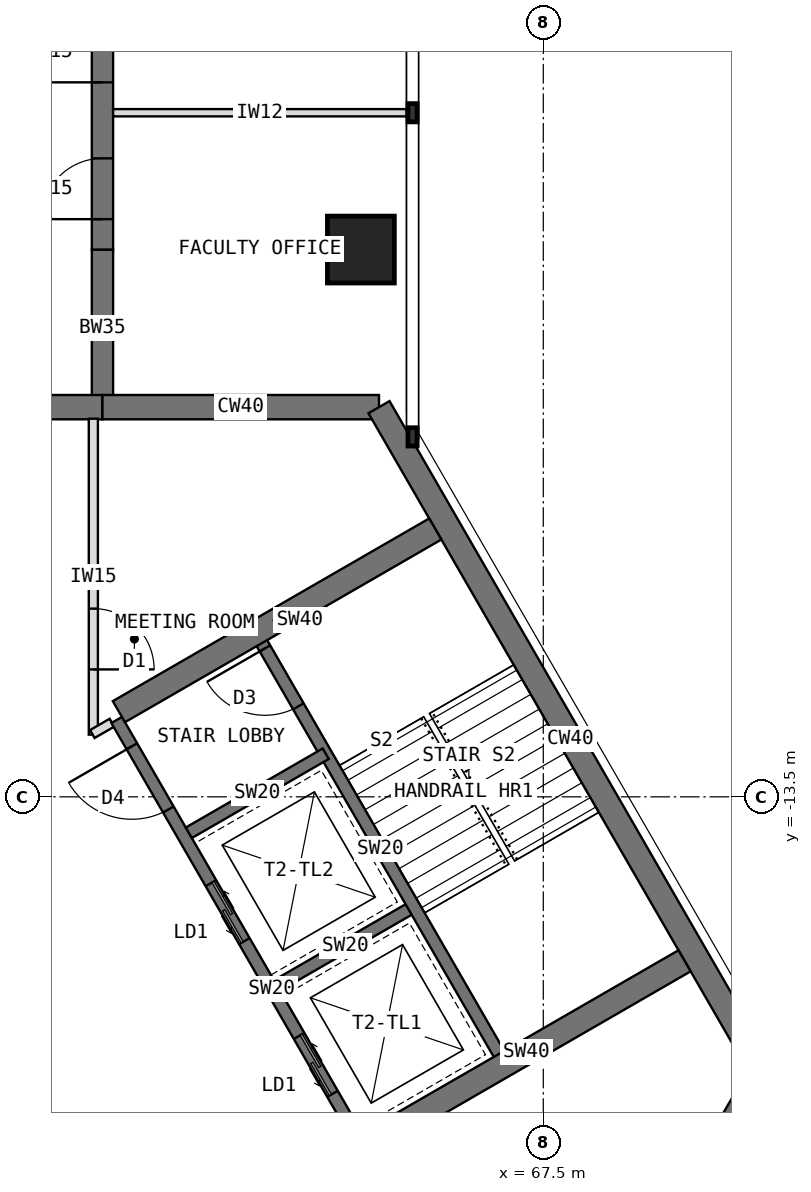
"""IFC4 building model, lengths in metres.
Left out: names, types, materials, properties, quantities, classifications, styles, units other than length and angle.
Written with IfcOpenShell. Run it as: python <this file> out.ifc"""

import sys

from ifc_helpers import new_model, si_unit, direction, frame, frame_2d, origin, origin_2d, place, context, subcontext, project, spatial, rectangle, extrude, element, fill, save


model = new_model("IFC4")
c1 = context("Model", 3, precision=1e-05, world=origin(), true_north=direction((0.0, 1.0)))
c2 = subcontext(c1, "Body", "Model", "MODEL_VIEW")
j1 = project(units=[si_unit("LENGTHUNIT", "METRE"), si_unit("PLANEANGLEUNIT", "RADIAN")], contexts=[c1])
p1 = place(None, origin())
s1 = spatial("IfcSite", under=j1, at=p1, CompositionType="ELEMENT")
p2 = place(p1, origin())
s2 = spatial("IfcBuilding", under=s1, at=p2, CompositionType="ELEMENT")
p3 = place(p2, frame((0.0, 0.0, 243.5)))
s3 = spatial("IfcBuildingStorey", under=s2, at=p3, CompositionType="ELEMENT", Elevation=243.5)
p4 = place(p3, frame((64.798, -7.092, 0.0), z_axis=(0.0, 0.0, 1.0), x_axis=(-1.0, 0.0, 0.0)))
e1 = element("IfcWall", 1, at=p4, inside=s3, PredefinedType="SHEAR", context=c2, shape_type="SweptSolid", body=[
    extrude(rectangle(XDim=4.548, YDim=0.4, at=frame_2d((2.274, 0.0))), origin(), (0.0, 0.0, 1.0), 4.0),
])
p5 = place(p3, frame((60.25, -7.092, 0.0), z_axis=(0.0, 0.0, 1.0), x_axis=(-1.0, 0.0, 0.0)))
e2 = element("IfcWall", 2, at=p5, inside=s3, PredefinedType="SHEAR", context=c2, shape_type="SweptSolid", body=[
    extrude(rectangle(XDim=3.5, YDim=0.4, at=frame_2d((1.75, 0.0))), origin(), (0.0, 0.0, 1.0), 4.0),
])
p6 = place(p5, frame((0.85, 0.0, 0.0)))
e3 = element("IfcOpeningElement", 3, at=p6, cuts=e2, PredefinedType="OPENING", context=c2, shape_type="SweptSolid", body=[
    extrude(rectangle(XDim=1.8, YDim=2.1, at=frame_2d((0.9, 1.05))), frame((0.0, 0.21, 0.0), z_axis=(0.0, -1.0, 0.0), x_axis=(1.0, 0.0, 0.0)), (0.0, 0.0, 1.0), 0.42),
])
p7 = place(p3, frame((68.822, -21.939, 0.0), z_axis=(0.0, 0.0, 1.0), x_axis=(0.500024481964, 0.866011268655, 0.0)))
e4 = element("IfcWall", 4, at=p7, inside=s3, PredefinedType="SHEAR", context=c2, shape_type="SweptSolid", body=[
    extrude(rectangle(XDim=4.548, YDim=0.4, at=frame_2d((2.274, 0.0))), origin(), (0.0, 0.0, 1.0), 4.0),
])
p8 = place(p3, frame((71.096, -18.0, 0.0), z_axis=(0.0, 0.0, 1.0), x_axis=(-0.500005998175, 0.866021940709, 0.0)))
e5 = element("IfcWall", 5, at=p8, inside=s3, PredefinedType="SHEAR", context=c2, shape_type="SweptSolid", body=[
    extrude(rectangle(XDim=12.596, YDim=0.4, at=frame_2d((6.298, 0.0))), origin(), (0.0, 0.0, 1.0), 4.0),
])
p9 = place(p3, frame((60.25, -7.092, 0.0), z_axis=(0.0, 0.0, 1.0), x_axis=(0.0, 1.0, 0.0)))
e6 = element("IfcWall", 6, at=p9, inside=s3, PredefinedType="SHEAR", context=c2, shape_type="SweptSolid", body=[
    extrude(rectangle(XDim=2.592, YDim=0.35, at=frame_2d((1.296, 0.0))), origin(), (0.0, 0.0, 1.0), 4.0),
])
p10 = place(p3, frame((60.25, -4.5, 0.0), z_axis=(0.0, 0.0, 1.0), x_axis=(0.0, 1.0, 0.0)))
e7 = element("IfcWall", 7, at=p10, inside=s3, PredefinedType="SHEAR", context=c2, shape_type="SweptSolid", body=[
    extrude(rectangle(XDim=13.2, YDim=0.35, at=frame_2d((6.6, 0.0))), origin(), (0.0, 0.0, 1.0), 4.0),
])
p11 = place(p10, frame((0.5, 0.0, 0.0)))
e8 = element("IfcOpeningElement", 8, at=p11, cuts=e7, PredefinedType="OPENING", context=c2, shape_type="SweptSolid", body=[
    extrude(rectangle(XDim=1.0, YDim=2.1, at=frame_2d((0.5, 1.05))), frame((0.0, 0.185, 0.0), z_axis=(0.0, -1.0, 0.0), x_axis=(1.0, 0.0, 0.0)), (0.0, 0.0, 1.0), 0.37),
])
p12 = place(p10, frame((2.75, 0.0, 0.0)))
e9 = element("IfcOpeningElement", 9, at=p12, cuts=e7, PredefinedType="OPENING", context=c2, shape_type="SweptSolid", body=[
    extrude(rectangle(XDim=1.0, YDim=2.1, at=frame_2d((0.5, 1.05))), frame((0.0, 0.185, 0.0), z_axis=(0.0, -1.0, 0.0), x_axis=(1.0, 0.0, 0.0)), (0.0, 0.0, 1.0), 0.37),
])
p13 = place(p10, frame((7.25, 0.0, 0.0)))
e10 = element("IfcOpeningElement", 10, at=p13, cuts=e7, PredefinedType="OPENING", context=c2, shape_type="SweptSolid", body=[
    extrude(rectangle(XDim=1.0, YDim=2.1, at=frame_2d((0.5, 1.05))), frame((0.0, 0.185, 0.0), z_axis=(0.0, -1.0, 0.0), x_axis=(1.0, 0.0, 0.0)), (0.0, 0.0, 1.0), 0.37),
])
p14 = place(p3, frame((64.5, -4.5, 0.0), z_axis=(0.0, 0.0, 1.0), x_axis=(1.0, 0.0, 0.0)))
e11 = element("IfcColumn", 11, at=p14, inside=s3, PredefinedType="COLUMN", context=c2, shape_type="SweptSolid", body=[
    extrude(rectangle(XDim=1.1, YDim=1.1, at=origin_2d()), origin(), (0.0, 0.0, 1.0), 4.0),
])
p15 = place(p3, frame((64.484, -19.164, 0.0), z_axis=(0.0, 0.0, 1.0), x_axis=(-0.49999894854, 0.866026010844, 0.0)))
e12 = element("IfcWall", 12, at=p15, inside=s3, PredefinedType="SHEAR", context=c2, shape_type="SweptSolid", body=[
    extrude(rectangle(XDim=8.0, YDim=0.2, at=frame_2d((4.0, 0.0))), origin(), (0.0, 0.0, 1.0), 4.0),
])
p16 = place(p15, frame((6.3, 0.0, 0.0)))
e13 = element("IfcOpeningElement", 13, at=p16, cuts=e12, PredefinedType="OPENING", context=c2, shape_type="SweptSolid", body=[
    extrude(rectangle(XDim=1.2, YDim=2.1, at=frame_2d((0.6, 1.05))), frame((0.0, 0.11, 0.0), z_axis=(0.0, -1.0, 0.0), x_axis=(1.0, 0.0, 0.0)), (0.0, 0.0, 1.0), 0.22),
])
p17 = place(p15, frame((0.9, 0.0, 0.0)))
e14 = element("IfcOpeningElement", 14, at=p17, cuts=e12, PredefinedType="OPENING", context=c2, shape_type="SweptSolid", body=[
    extrude(rectangle(XDim=1.1, YDim=2.2, at=frame_2d((0.55, 1.1))), frame((0.0, 0.11, 0.0), z_axis=(0.0, -1.0, 0.0), x_axis=(1.0, 0.0, 0.0)), (0.0, 0.0, 1.0), 0.22),
])
p18 = place(p15, frame((3.8, 0.0, 0.0)))
e15 = element("IfcOpeningElement", 15, at=p18, cuts=e12, PredefinedType="OPENING", context=c2, shape_type="SweptSolid", body=[
    extrude(rectangle(XDim=1.1, YDim=2.2, at=frame_2d((0.55, 1.1))), frame((0.0, 0.11, 0.0), z_axis=(0.0, -1.0, 0.0), x_axis=(1.0, 0.0, 0.0)), (0.0, 0.0, 1.0), 0.22),
])
p19 = place(p3, frame((63.12, -16.603, 0.0), z_axis=(0.0, 0.0, 1.0), x_axis=(0.866062058628, 0.499936506574, 0.0)))
e16 = element("IfcWall", 16, at=p19, inside=s3, PredefinedType="SHEAR", context=c2, shape_type="SweptSolid", body=[
    extrude(rectangle(XDim=2.6, YDim=0.2, at=frame_2d((1.3, 0.0))), origin(), (0.0, 0.0, 1.0), 4.0),
])
p20 = place(p3, frame((61.67, -14.091, 0.0), z_axis=(0.0, 0.0, 1.0), x_axis=(0.86603858612, 0.49997716683, 0.0)))
e17 = element("IfcWall", 17, at=p20, inside=s3, PredefinedType="SHEAR", context=c2, shape_type="SweptSolid", body=[
    extrude(rectangle(XDim=2.6, YDim=0.2, at=frame_2d((1.3, 0.0))), origin(), (0.0, 0.0, 1.0), 4.0),
])
p21 = place(p3, frame((66.822, -17.814, 0.0), z_axis=(0.0, 0.0, 1.0), x_axis=(-0.49999894854, 0.866026010844, 0.0)))
e18 = element("IfcWall", 18, at=p21, inside=s3, PredefinedType="SHEAR", context=c2, shape_type="SweptSolid", body=[
    extrude(rectangle(XDim=8.0, YDim=0.2, at=frame_2d((4.0, 0.0))), origin(), (0.0, 0.0, 1.0), 4.0),
])
p22 = place(p21, frame((6.7, 0.0, 0.0)))
e19 = element("IfcOpeningElement", 19, at=p22, cuts=e18, PredefinedType="OPENING", context=c2, shape_type="SweptSolid", body=[
    extrude(rectangle(XDim=1.1, YDim=2.1, at=frame_2d((0.55, 1.05))), frame((0.0, 0.11, 0.0), z_axis=(0.0, -1.0, 0.0), x_axis=(1.0, 0.0, 0.0)), (0.0, 0.0, 1.0), 0.22),
])
for number, where, z_axis, x_axis in (
    (20, (60.52, -12.099, 0.0), (0.0, 0.0, 1.0), (0.866, 0.5, 0.0)),
    (21, (64.62, -19.201, 0.0), (0.0, 0.0, 1.0), (0.866, 0.5, 0.0)),
):
    element("IfcWall", number, at=place(p3, frame(where, z_axis=z_axis, x_axis=x_axis)), inside=s3, PredefinedType="SHEAR", context=c2, shape_type="SweptSolid", body=[
        extrude(rectangle(XDim=6.008, YDim=0.4, at=frame_2d((3.004, 0.0))), origin(), (0.0, 0.0, 1.0), 4.0),
    ])
p23 = place(p3, frame((60.425, -2.25, 0.0), z_axis=(0.0, 0.0, 1.0), x_axis=(1.0, 0.0, 0.0)))
e22 = element("IfcWall", 22, at=p23, inside=s3, PredefinedType="PARTITIONING", context=c2, shape_type="SweptSolid", body=[
    extrude(rectangle(XDim=4.825, YDim=0.12, at=frame_2d((2.413, 0.0))), origin(), (0.0, 0.0, 1.0), 3.8),
])
p24 = place(p3, frame((60.1, -7.282, 0.0), z_axis=(0.0, 0.0, 1.0), x_axis=(0.0, -1.0, 0.0)))
e23 = element("IfcWall", 23, at=p24, inside=s3, PredefinedType="PARTITIONING", context=c2, shape_type="SweptSolid", body=[
    extrude(rectangle(XDim=5.196, YDim=0.15, at=frame_2d((2.598, 0.0))), origin(), (0.0, 0.0, 1.0), 3.8),
])
p25 = place(p24, frame((3.123, 0.0, 0.0)))
e24 = element("IfcOpeningElement", 24, at=p25, cuts=e23, PredefinedType="OPENING", context=c2, shape_type="SweptSolid", body=[
    extrude(rectangle(XDim=1.0, YDim=2.1, at=frame_2d((0.5, 1.05))), frame((0.0, 0.085, 0.0), z_axis=(0.0, -1.0, 0.0), x_axis=(1.0, 0.0, 0.0)), (0.0, 0.0, 1.0), 0.17),
])
p26 = place(p3, frame((60.083, -12.467, 0.0), z_axis=(0.0, 0.0, 1.0), x_axis=(0.866261881104, 0.499590185398, 0.0)))
e25 = element("IfcWall", 25, at=p26, inside=s3, PredefinedType="PARTITIONING", context=c2, shape_type="SweptSolid", body=[
    extrude(rectangle(XDim=0.373, YDim=0.15, at=frame_2d((0.187, 0.0))), origin(), (0.0, 0.0, 1.0), 3.8),
])
p27 = place(p16, origin())
e26 = element("IfcDoor", 26, at=p27, inside=s3, OperationType="SINGLE_SWING_RIGHT", PredefinedType="DOOR", context=c2, shape_type="SweptSolid", body=[
    extrude(rectangle(XDim=1.2, YDim=2.1, at=frame_2d((0.6, 1.05))), frame((0.0, 0.025, 0.0), z_axis=(0.0, -1.0, 0.0), x_axis=(1.0, 0.0, 0.0)), (0.0, 0.0, 1.0), 0.05),
])
fill(e13, e26)
p28 = place(p17, origin())
e27 = element("IfcDoor", 27, at=p28, inside=s3, OperationType="DOUBLE_DOOR_SLIDING", PredefinedType="DOOR", context=c2, shape_type="SweptSolid", body=[
    extrude(rectangle(XDim=1.1, YDim=2.2, at=frame_2d((0.55, 1.1))), frame((0.0, 0.025, 0.0), z_axis=(0.0, -1.0, 0.0), x_axis=(1.0, 0.0, 0.0)), (0.0, 0.0, 1.0), 0.05),
])
fill(e14, e27)
p29 = place(p18, origin())
e28 = element("IfcDoor", 28, at=p29, inside=s3, OperationType="DOUBLE_DOOR_SLIDING", PredefinedType="DOOR", context=c2, shape_type="SweptSolid", body=[
    extrude(rectangle(XDim=1.1, YDim=2.2, at=frame_2d((0.55, 1.1))), frame((0.0, 0.025, 0.0), z_axis=(0.0, -1.0, 0.0), x_axis=(1.0, 0.0, 0.0)), (0.0, 0.0, 1.0), 0.05),
])
fill(e15, e28)
p30 = place(p22, origin())
e29 = element("IfcDoor", 29, at=p30, inside=s3, OperationType="SINGLE_SWING_RIGHT", PredefinedType="DOOR", context=c2, shape_type="SweptSolid", body=[
    extrude(rectangle(XDim=1.1, YDim=2.1, at=frame_2d((0.55, 1.05))), frame((0.0, 0.025, 0.0), z_axis=(0.0, -1.0, 0.0), x_axis=(1.0, 0.0, 0.0)), (0.0, 0.0, 1.0), 0.05),
])
fill(e19, e29)
p31 = place(p25, origin())
e30 = element("IfcDoor", 30, at=p31, inside=s3, OperationType="SINGLE_SWING_RIGHT", PredefinedType="DOOR", context=c2, shape_type="SweptSolid", body=[
    extrude(rectangle(XDim=1.0, YDim=2.1, at=frame_2d((0.5, 1.05))), frame((0.0, 0.025, 0.0), z_axis=(0.0, -1.0, 0.0), x_axis=(1.0, 0.0, 0.0)), (0.0, 0.0, 1.0), 0.05),
])
fill(e24, e30)
p32 = place(p11, origin())
e31 = element("IfcDoor", 31, at=p32, inside=s3, OperationType="SINGLE_SWING_LEFT", PredefinedType="DOOR", context=c2, shape_type="SweptSolid", body=[
    extrude(rectangle(XDim=1.0, YDim=2.1, at=frame_2d((0.5, 1.05))), frame((0.0, 0.025, 0.0), z_axis=(0.0, -1.0, 0.0), x_axis=(1.0, 0.0, 0.0)), (0.0, 0.0, 1.0), 0.05),
])
fill(e8, e31)
p33 = place(p12, origin())
e32 = element("IfcDoor", 32, at=p33, inside=s3, OperationType="SINGLE_SWING_LEFT", PredefinedType="DOOR", context=c2, shape_type="SweptSolid", body=[
    extrude(rectangle(XDim=1.0, YDim=2.1, at=frame_2d((0.5, 1.05))), frame((0.0, 0.025, 0.0), z_axis=(0.0, -1.0, 0.0), x_axis=(1.0, 0.0, 0.0)), (0.0, 0.0, 1.0), 0.05),
])
fill(e9, e32)
save(model, sys.argv[1])
